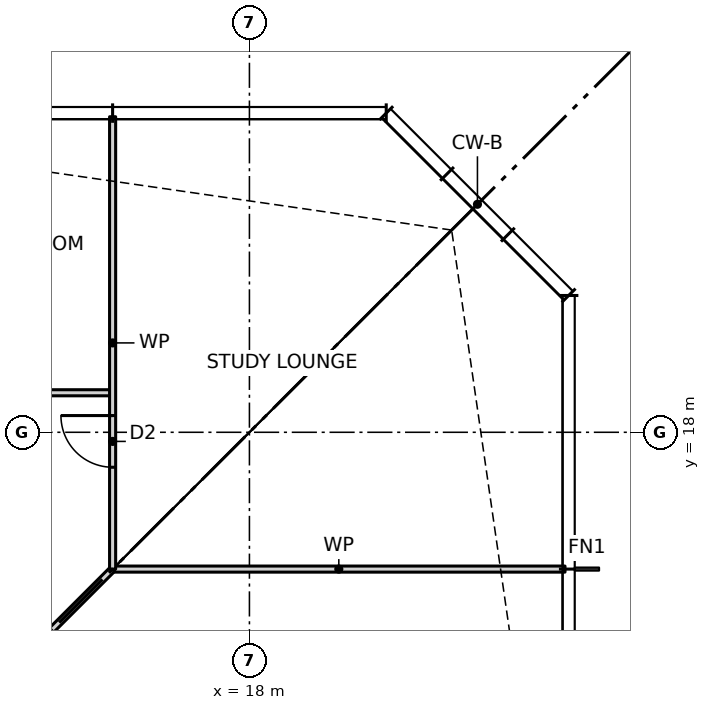
"""IFC4 building model, lengths in metres.
Left out: names, types, materials, properties, quantities, classifications, styles, units other than length and angle.
Written with IfcOpenShell. Run it as: python <this file> out.ifc"""

import sys

from ifc_helpers import new_model, si_unit, direction, frame, frame_2d, origin, place, context, subcontext, project, spatial, rectangle, extrude, element, fill, save


model = new_model("IFC4")
c1 = context("Model", 3, precision=1e-05, world=origin(), true_north=direction((0.0, 1.0)))
c2 = subcontext(c1, "Body", "Model", "MODEL_VIEW")
j1 = project(units=[si_unit("LENGTHUNIT", "METRE"), si_unit("PLANEANGLEUNIT", "RADIAN")], contexts=[c1])
p1 = place(None, origin())
s1 = spatial("IfcSite", under=j1, at=p1, CompositionType="ELEMENT")
p2 = place(p1, origin())
s2 = spatial("IfcBuilding", under=s1, at=p2, CompositionType="ELEMENT")
p3 = place(p2, frame((0.0, 0.0, 71.0)))
s3 = spatial("IfcBuildingStorey", under=s2, at=p3, CompositionType="ELEMENT", Elevation=71.0)
p4 = place(p3, frame((15.75, 15.75, 0.0), z_axis=(0.0, 0.0, 1.0), x_axis=(1.0, 0.0, 0.0)))
e1 = element("IfcWall", 1, at=p4, inside=s3, PredefinedType="PARTITIONING", context=c2, shape_type="SweptSolid", body=[
    extrude(rectangle(XDim=7.44, YDim=0.1, at=frame_2d((3.72, 0.0))), origin(), (0.0, 0.0, 1.0), 3.2),
])
p5 = place(p3, frame((-11.25, 18.65, 0.0), z_axis=(0.0, 0.0, 1.0), x_axis=(1.0, 0.0, 0.0)))
e2 = element("IfcWall", 2, at=p5, inside=s3, PredefinedType="PARTITIONING", context=c2, shape_type="SweptSolid", body=[
    extrude(rectangle(XDim=27.0, YDim=0.1, at=frame_2d((13.5, 0.0))), origin(), (0.0, 0.0, 1.0), 3.2),
])
p6 = place(p5, frame((24.3, 0.0, 0.0)))
e3 = element("IfcOpeningElement", 3, at=p6, cuts=e2, PredefinedType="OPENING", context=c2, shape_type="SweptSolid", body=[
    extrude(rectangle(XDim=0.9, YDim=2.1, at=frame_2d((0.45, 1.05))), frame((0.0, 0.06, 0.0), z_axis=(0.0, -1.0, 0.0), x_axis=(1.0, 0.0, 0.0)), (0.0, 0.0, 1.0), 0.12),
])
p7 = place(p5, frame((19.8, 0.0, 0.0)))
e4 = element("IfcOpeningElement", 4, at=p7, cuts=e2, PredefinedType="OPENING", context=c2, shape_type="SweptSolid", body=[
    extrude(rectangle(XDim=0.9, YDim=2.1, at=frame_2d((0.45, 1.05))), frame((0.0, 0.06, 0.0), z_axis=(0.0, -1.0, 0.0), x_axis=(1.0, 0.0, 0.0)), (0.0, 0.0, 1.0), 0.12),
])
p8 = place(p5, frame((15.3, 0.0, 0.0)))
e5 = element("IfcOpeningElement", 5, at=p8, cuts=e2, PredefinedType="OPENING", context=c2, shape_type="SweptSolid", body=[
    extrude(rectangle(XDim=0.9, YDim=2.1, at=frame_2d((0.45, 1.05))), frame((0.0, 0.06, 0.0), z_axis=(0.0, -1.0, 0.0), x_axis=(1.0, 0.0, 0.0)), (0.0, 0.0, 1.0), 0.12),
])
p9 = place(p5, frame((10.8, 0.0, 0.0)))
e6 = element("IfcOpeningElement", 6, at=p9, cuts=e2, PredefinedType="OPENING", context=c2, shape_type="SweptSolid", body=[
    extrude(rectangle(XDim=0.9, YDim=2.1, at=frame_2d((0.45, 1.05))), frame((0.0, 0.06, 0.0), z_axis=(0.0, -1.0, 0.0), x_axis=(1.0, 0.0, 0.0)), (0.0, 0.0, 1.0), 0.12),
])
p10 = place(p5, frame((6.3, 0.0, 0.0)))
e7 = element("IfcOpeningElement", 7, at=p10, cuts=e2, PredefinedType="OPENING", context=c2, shape_type="SweptSolid", body=[
    extrude(rectangle(XDim=0.9, YDim=2.1, at=frame_2d((0.45, 1.05))), frame((0.0, 0.06, 0.0), z_axis=(0.0, -1.0, 0.0), x_axis=(1.0, 0.0, 0.0)), (0.0, 0.0, 1.0), 0.12),
])
p11 = place(p5, frame((1.8, 0.0, 0.0)))
e8 = element("IfcOpeningElement", 8, at=p11, cuts=e2, PredefinedType="OPENING", context=c2, shape_type="SweptSolid", body=[
    extrude(rectangle(XDim=0.9, YDim=2.1, at=frame_2d((0.45, 1.05))), frame((0.0, 0.06, 0.0), z_axis=(0.0, -1.0, 0.0), x_axis=(1.0, 0.0, 0.0)), (0.0, 0.0, 1.0), 0.12),
])
p12 = place(p3, frame((11.6, 11.6, 0.0), z_axis=(0.0, 0.0, 1.0), x_axis=(0.707106781187, 0.707106781187, 0.0)))
e9 = element("IfcWall", 9, at=p12, inside=s3, PredefinedType="PARTITIONING", context=c2, shape_type="SweptSolid", body=[
    extrude(rectangle(XDim=5.869, YDim=0.1, at=frame_2d((2.935, 0.0))), origin(), (0.0, 0.0, 1.0), 3.2),
])
p13 = place(p3, frame((15.75, 15.75, 0.0), z_axis=(0.0, 0.0, 1.0), x_axis=(0.0, 1.0, 0.0)))
e10 = element("IfcWall", 10, at=p13, inside=s3, PredefinedType="PARTITIONING", context=c2, shape_type="SweptSolid", body=[
    extrude(rectangle(XDim=7.44, YDim=0.1, at=frame_2d((3.72, 0.0))), origin(), (0.0, 0.0, 1.0), 3.2),
])
p14 = place(p13, frame((1.675, 0.0, 0.0)))
e11 = element("IfcOpeningElement", 11, at=p14, cuts=e10, PredefinedType="OPENING", context=c2, shape_type="SweptSolid", body=[
    extrude(rectangle(XDim=0.85, YDim=2.1, at=frame_2d((0.425, 1.05))), frame((0.0, 0.06, 0.0), z_axis=(0.0, -1.0, 0.0), x_axis=(1.0, 0.0, 0.0)), (0.0, 0.0, 1.0), 0.12),
])
p15 = place(p14, origin())
e12 = element("IfcDoor", 12, at=p15, inside=s3, OperationType="SINGLE_SWING_RIGHT", PredefinedType="DOOR", context=c2, shape_type="SweptSolid", body=[
    extrude(rectangle(XDim=0.85, YDim=2.1, at=frame_2d((0.425, 1.05))), frame((0.0, 0.025, 0.0), z_axis=(0.0, -1.0, 0.0), x_axis=(1.0, 0.0, 0.0)), (0.0, 0.0, 1.0), 0.05),
])
fill(e11, e12)
save(model, sys.argv[1])
